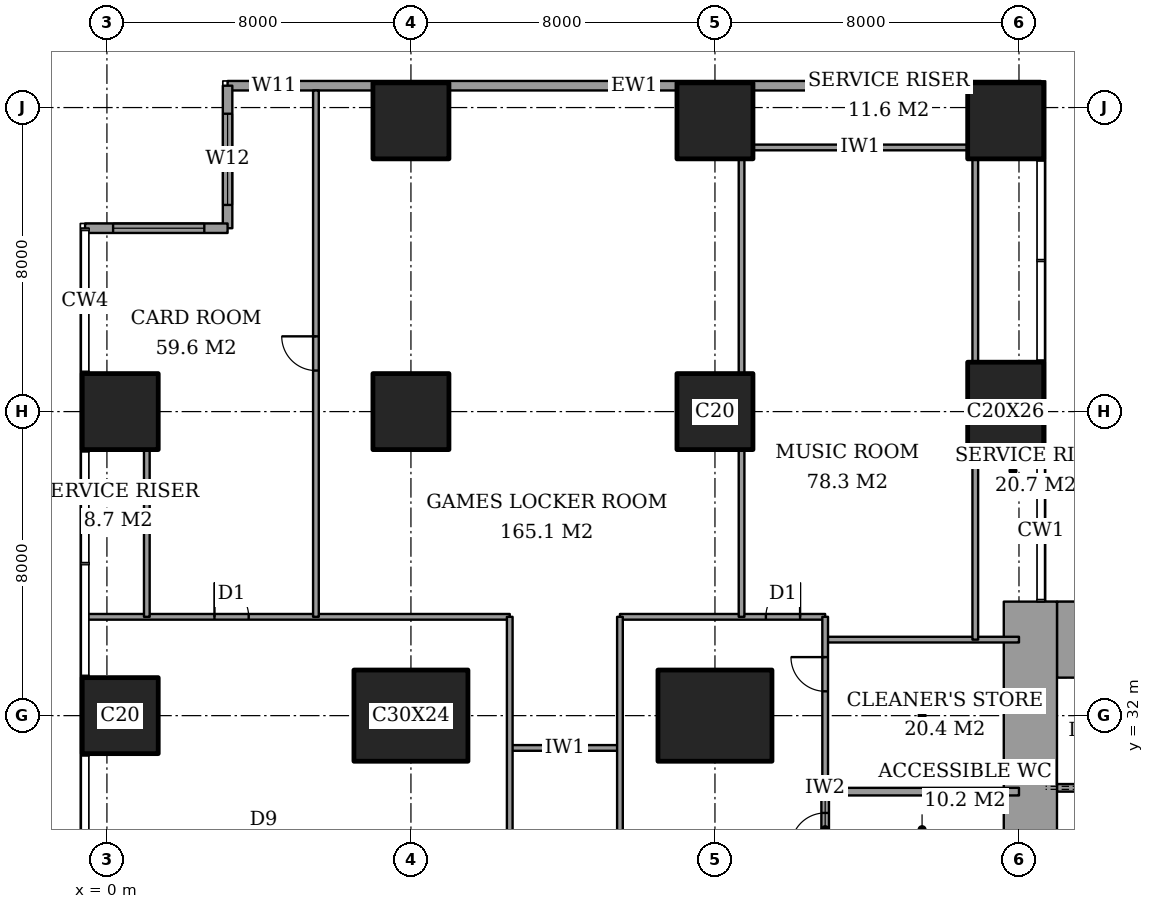
"""IFC4 building model, lengths in metres.
Left out: names, types, materials, properties, quantities, classifications, styles, units other than length and angle.
Written with IfcOpenShell. Run it as: python <this file> out.ifc"""

import sys

from ifc_helpers import new_model, si_unit, direction, frame, frame_2d, origin, origin_2d, place, context, subcontext, project, spatial, rectangle, extrude, element, fill, save


model = new_model("IFC4")
c1 = context("Model", 3, precision=1e-05, world=origin(), true_north=direction((0.0, 1.0)))
c2 = subcontext(c1, "Body", "Model", "MODEL_VIEW")
j1 = project(units=[si_unit("LENGTHUNIT", "METRE"), si_unit("PLANEANGLEUNIT", "RADIAN")], contexts=[c1])
p1 = place(None, origin())
s1 = spatial("IfcSite", under=j1, at=p1, CompositionType="ELEMENT")
p2 = place(p1, origin())
s2 = spatial("IfcBuilding", under=s1, at=p2, CompositionType="ELEMENT")
p3 = place(p2, frame((0.0, 0.0, 132.2)))
s3 = spatial("IfcBuildingStorey", under=s2, at=p3, CompositionType="ELEMENT", Elevation=132.2)
for number, where, z_axis, x_axis in (
    (1, (0.35, 32.0, 0.0), (0.0, 0.0, 1.0), (1.0, 0.0, 0.0)),
    (2, (0.35, 40.0, 0.0), (0.0, 0.0, 1.0), (1.0, 0.0, 0.0)),
):
    element("IfcColumn", number, at=place(p3, frame(where, z_axis=z_axis, x_axis=x_axis)), inside=s3, PredefinedType="COLUMN", context=c2, shape_type="SweptSolid", body=[
        extrude(rectangle(XDim=2.0, YDim=2.0, at=origin_2d()), origin(), (0.0, 0.0, 1.0), 3.6),
    ])
p4 = place(p3, frame((8.0, 32.0, 0.0), z_axis=(0.0, 0.0, 1.0), x_axis=(1.0, 0.0, 0.0)))
e3 = element("IfcColumn", 3, at=p4, inside=s3, PredefinedType="COLUMN", context=c2, shape_type="SweptSolid", body=[
    extrude(rectangle(XDim=3.0, YDim=2.4, at=origin_2d()), origin(), (0.0, 0.0, 1.0), 3.6),
])
for number, where, z_axis, x_axis in (
    (4, (8.0, 40.0, 0.0), (0.0, 0.0, 1.0), (1.0, 0.0, 0.0)),
    (5, (8.0, 47.65, 0.0), (0.0, 0.0, 1.0), (1.0, 0.0, 0.0)),
):
    element("IfcColumn", number, at=place(p3, frame(where, z_axis=z_axis, x_axis=x_axis)), inside=s3, PredefinedType="COLUMN", context=c2, shape_type="SweptSolid", body=[
        extrude(rectangle(XDim=2.0, YDim=2.0, at=origin_2d()), origin(), (0.0, 0.0, 1.0), 3.6),
    ])
p5 = place(p3, frame((16.0, 32.0, 0.0), z_axis=(0.0, 0.0, 1.0), x_axis=(1.0, 0.0, 0.0)))
e6 = element("IfcColumn", 6, at=p5, inside=s3, PredefinedType="COLUMN", context=c2, shape_type="SweptSolid", body=[
    extrude(rectangle(XDim=3.0, YDim=2.4, at=origin_2d()), origin(), (0.0, 0.0, 1.0), 3.6),
])
for number, where, z_axis, x_axis in (
    (7, (16.0, 40.0, 0.0), (0.0, 0.0, 1.0), (1.0, 0.0, 0.0)),
    (8, (16.0, 47.65, 0.0), (0.0, 0.0, 1.0), (1.0, 0.0, 0.0)),
):
    element("IfcColumn", number, at=place(p3, frame(where, z_axis=z_axis, x_axis=x_axis)), inside=s3, PredefinedType="COLUMN", context=c2, shape_type="SweptSolid", body=[
        extrude(rectangle(XDim=2.0, YDim=2.0, at=origin_2d()), origin(), (0.0, 0.0, 1.0), 3.6),
    ])
p6 = place(p3, frame((23.65, 40.0, 0.0), z_axis=(0.0, 0.0, 1.0), x_axis=(1.0, 0.0, 0.0)))
e9 = element("IfcColumn", 9, at=p6, inside=s3, PredefinedType="COLUMN", context=c2, shape_type="SweptSolid", body=[
    extrude(rectangle(XDim=2.0, YDim=2.6, at=origin_2d()), origin(), (0.0, 0.0, 1.0), 3.6),
])
p7 = place(p3, frame((23.65, 47.65, 0.0), z_axis=(0.0, 0.0, 1.0), x_axis=(1.0, 0.0, 0.0)))
e10 = element("IfcColumn", 10, at=p7, inside=s3, PredefinedType="COLUMN", context=c2, shape_type="SweptSolid", body=[
    extrude(rectangle(XDim=2.0, YDim=2.0, at=origin_2d()), origin(), (0.0, 0.0, 1.0), 3.6),
])
p8 = place(p3, frame((25.0, 34.0, 0.0), z_axis=(0.0, 0.0, 1.0), x_axis=(1.0, 0.0, 0.0)))
e11 = element("IfcWall", 11, at=p8, inside=s3, PredefinedType="SHEAR", context=c2, shape_type="SweptSolid", body=[
    extrude(rectangle(XDim=3.15, YDim=2.0, at=frame_2d((1.575, 0.0))), origin(), (0.0, 0.0, 1.0), 3.6),
])
p9 = place(p3, frame((24.3, 23.15, 0.0), z_axis=(0.0, 0.0, 1.0), x_axis=(0.0, 1.0, 0.0)))
e12 = element("IfcWall", 12, at=p9, inside=s3, PredefinedType="SHEAR", context=c2, shape_type="SweptSolid", body=[
    extrude(rectangle(XDim=11.85, YDim=1.4, at=frame_2d((5.925, 0.0))), origin(), (0.0, 0.0, 1.0), 3.6),
])
p10 = place(p9, frame((0.75, 0.0, 0.0)))
e13 = element("IfcOpeningElement", 13, at=p10, cuts=e12, PredefinedType="OPENING", context=c2, shape_type="SweptSolid", body=[
    extrude(rectangle(XDim=1.8, YDim=2.4, at=frame_2d((0.9, 1.2))), frame((0.0, 0.71, 0.0), z_axis=(0.0, -1.0, 0.0), x_axis=(1.0, 0.0, 0.0)), (0.0, 0.0, 1.0), 1.42),
])
p11 = place(p3, frame((24.575, 48.575, 0.0), z_axis=(0.0, 0.0, 1.0), x_axis=(-1.0, 0.0, 0.0)))
e14 = element("IfcWall", 14, at=p11, inside=s3, PredefinedType="SOLIDWALL", context=c2, shape_type="SweptSolid", body=[
    extrude(rectangle(XDim=21.4, YDim=0.25, at=frame_2d((10.7, 0.0))), origin(), (0.0, 0.0, 1.0), 3.6),
])
p12 = place(p11, frame((19.575, 0.0, 0.4)))
e15 = element("IfcOpeningElement", 15, at=p12, cuts=e14, PredefinedType="OPENING", context=c2, shape_type="SweptSolid", body=[
    extrude(rectangle(XDim=1.2, YDim=2.2, at=frame_2d((0.6, 1.1))), frame((0.0, 0.135, 0.0), z_axis=(0.0, -1.0, 0.0), x_axis=(1.0, 0.0, 0.0)), (0.0, 0.0, 1.0), 0.27),
])
p13 = place(p3, frame((3.175, 48.575, 0.0), z_axis=(0.0, 0.0, 1.0), x_axis=(0.0, -1.0, 0.0)))
e16 = element("IfcWall", 16, at=p13, inside=s3, PredefinedType="SOLIDWALL", context=c2, shape_type="SweptSolid", body=[
    extrude(rectangle(XDim=3.75, YDim=0.25, at=frame_2d((1.875, 0.0))), origin(), (0.0, 0.0, 1.0), 3.6),
])
p14 = place(p13, frame((0.738, 0.0, 0.4)))
e17 = element("IfcOpeningElement", 17, at=p14, cuts=e16, PredefinedType="OPENING", context=c2, shape_type="SweptSolid", body=[
    extrude(rectangle(XDim=2.4, YDim=2.2, at=frame_2d((1.2, 1.1))), frame((0.0, 0.135, 0.0), z_axis=(0.0, -1.0, 0.0), x_axis=(1.0, 0.0, 0.0)), (0.0, 0.0, 1.0), 0.27),
])
p15 = place(p3, frame((3.175, 44.825, 0.0), z_axis=(0.0, 0.0, 1.0), x_axis=(-1.0, 0.0, 0.0)))
e18 = element("IfcWall", 18, at=p15, inside=s3, PredefinedType="SOLIDWALL", context=c2, shape_type="SweptSolid", body=[
    extrude(rectangle(XDim=3.75, YDim=0.25, at=frame_2d((1.875, 0.0))), origin(), (0.0, 0.0, 1.0), 3.6),
])
p16 = place(p15, frame((0.613, 0.0, 0.4)))
e19 = element("IfcOpeningElement", 19, at=p16, cuts=e18, PredefinedType="OPENING", context=c2, shape_type="SweptSolid", body=[
    extrude(rectangle(XDim=2.4, YDim=2.2, at=frame_2d((1.2, 1.1))), frame((0.0, 0.135, 0.0), z_axis=(0.0, -1.0, 0.0), x_axis=(1.0, 0.0, 0.0)), (0.0, 0.0, 1.0), 0.27),
])
p17 = place(p3, frame((18.9, 30.0, 0.0), z_axis=(0.0, 0.0, 1.0), x_axis=(1.0, 0.0, 0.0)))
e20 = element("IfcWall", 20, at=p17, inside=s3, PredefinedType="PARTITIONING", context=c2, shape_type="SweptSolid", body=[
    extrude(rectangle(XDim=5.1, YDim=0.2, at=frame_2d((2.55, 0.0))), origin(), (0.0, 0.0, 1.0), 3.35),
])
p18 = place(p3, frame((10.6, 31.15, 0.0), z_axis=(0.0, 0.0, 1.0), x_axis=(1.0, 0.0, 0.0)))
e21 = element("IfcWall", 21, at=p18, inside=s3, PredefinedType="PARTITIONING", context=c2, shape_type="SweptSolid", body=[
    extrude(rectangle(XDim=2.9, YDim=0.15, at=frame_2d((1.45, 0.0))), origin(), (0.0, 0.0, 1.0), 3.35),
])
p19 = place(p3, frame((18.9, 34.0, 0.0), z_axis=(0.0, 0.0, 1.0), x_axis=(1.0, 0.0, 0.0)))
e22 = element("IfcWall", 22, at=p19, inside=s3, PredefinedType="PARTITIONING", context=c2, shape_type="SweptSolid", body=[
    extrude(rectangle(XDim=5.1, YDim=0.15, at=frame_2d((2.55, 0.0))), origin(), (0.0, 0.0, 1.0), 3.35),
])
p20 = place(p3, frame((-0.561, 34.6, 0.0), z_axis=(0.0, 0.0, 1.0), x_axis=(1.0, 0.0, 0.0)))
e23 = element("IfcWall", 23, at=p20, inside=s3, PredefinedType="PARTITIONING", context=c2, shape_type="SweptSolid", body=[
    extrude(rectangle(XDim=11.161, YDim=0.15, at=frame_2d((5.581, 0.0))), origin(), (0.0, 0.0, 1.0), 3.35),
])
p21 = place(p20, frame((3.391, 0.0, 0.0)))
e24 = element("IfcOpeningElement", 24, at=p21, cuts=e23, PredefinedType="OPENING", context=c2, shape_type="SweptSolid", body=[
    extrude(rectangle(XDim=0.9, YDim=2.1, at=frame_2d((0.45, 1.05))), frame((0.0, 0.085, 0.0), z_axis=(0.0, -1.0, 0.0), x_axis=(1.0, 0.0, 0.0)), (0.0, 0.0, 1.0), 0.17),
])
p22 = place(p3, frame((13.5, 34.6, 0.0), z_axis=(0.0, 0.0, 1.0), x_axis=(1.0, 0.0, 0.0)))
e25 = element("IfcWall", 25, at=p22, inside=s3, PredefinedType="PARTITIONING", context=c2, shape_type="SweptSolid", body=[
    extrude(rectangle(XDim=5.4, YDim=0.15, at=frame_2d((2.7, 0.0))), origin(), (0.0, 0.0, 1.0), 3.35),
])
p23 = place(p22, frame((3.84, 0.0, 0.0)))
e26 = element("IfcOpeningElement", 26, at=p23, cuts=e25, PredefinedType="OPENING", context=c2, shape_type="SweptSolid", body=[
    extrude(rectangle(XDim=0.9, YDim=2.1, at=frame_2d((0.45, 1.05))), frame((0.0, 0.085, 0.0), z_axis=(0.0, -1.0, 0.0), x_axis=(1.0, 0.0, 0.0)), (0.0, 0.0, 1.0), 0.17),
])
p24 = place(p3, frame((17.0, 46.95, 0.0), z_axis=(0.0, 0.0, 1.0), x_axis=(1.0, 0.0, 0.0)))
e27 = element("IfcWall", 27, at=p24, inside=s3, PredefinedType="PARTITIONING", context=c2, shape_type="SweptSolid", body=[
    extrude(rectangle(XDim=5.65, YDim=0.15, at=frame_2d((2.825, 0.0))), origin(), (0.0, 0.0, 1.0), 3.35),
])
p25 = place(p3, frame((1.05, 34.6, 0.0), z_axis=(0.0, 0.0, 1.0), x_axis=(0.0, 1.0, 0.0)))
e28 = element("IfcWall", 28, at=p25, inside=s3, PredefinedType="PARTITIONING", context=c2, shape_type="SweptSolid", body=[
    extrude(rectangle(XDim=4.4, YDim=0.15, at=frame_2d((2.2, 0.0))), origin(), (0.0, 0.0, 1.0), 3.35),
])
p26 = place(p3, frame((5.5, 34.6, 0.0), z_axis=(0.0, 0.0, 1.0), x_axis=(0.0, 1.0, 0.0)))
e29 = element("IfcWall", 29, at=p26, inside=s3, PredefinedType="PARTITIONING", context=c2, shape_type="SweptSolid", body=[
    extrude(rectangle(XDim=13.85, YDim=0.15, at=frame_2d((6.925, 0.0))), origin(), (0.0, 0.0, 1.0), 3.35),
])
p27 = place(p26, frame((6.48, 0.0, 0.0)))
e30 = element("IfcOpeningElement", 30, at=p27, cuts=e29, PredefinedType="OPENING", context=c2, shape_type="SweptSolid", body=[
    extrude(rectangle(XDim=0.9, YDim=2.1, at=frame_2d((0.45, 1.05))), frame((0.0, 0.085, 0.0), z_axis=(0.0, -1.0, 0.0), x_axis=(1.0, 0.0, 0.0)), (0.0, 0.0, 1.0), 0.17),
])
p28 = place(p3, frame((10.6, 13.4, 0.0), z_axis=(0.0, 0.0, 1.0), x_axis=(0.0, 1.0, 0.0)))
e31 = element("IfcWall", 31, at=p28, inside=s3, PredefinedType="PARTITIONING", context=c2, shape_type="SweptSolid", body=[
    extrude(rectangle(XDim=21.2, YDim=0.15, at=frame_2d((10.6, 0.0))), origin(), (0.0, 0.0, 1.0), 3.35),
])
p29 = place(p28, frame((10.09, 0.0, 0.0)))
e32 = element("IfcOpeningElement", 32, at=p29, cuts=e31, PredefinedType="OPENING", context=c2, shape_type="SweptSolid", body=[
    extrude(rectangle(XDim=1.0, YDim=2.1, at=frame_2d((0.5, 1.05))), frame((0.0, 0.085, 0.0), z_axis=(0.0, -1.0, 0.0), x_axis=(1.0, 0.0, 0.0)), (0.0, 0.0, 1.0), 0.17),
])
p30 = place(p3, frame((13.5, 13.4, 0.0), z_axis=(0.0, 0.0, 1.0), x_axis=(0.0, 1.0, 0.0)))
e33 = element("IfcWall", 33, at=p30, inside=s3, PredefinedType="PARTITIONING", context=c2, shape_type="SweptSolid", body=[
    extrude(rectangle(XDim=21.2, YDim=0.15, at=frame_2d((10.6, 0.0))), origin(), (0.0, 0.0, 1.0), 3.35),
])
p31 = place(p30, frame((10.15, 0.0, 0.0)))
e34 = element("IfcOpeningElement", 34, at=p31, cuts=e33, PredefinedType="OPENING", context=c2, shape_type="SweptSolid", body=[
    extrude(rectangle(XDim=0.9, YDim=2.1, at=frame_2d((0.45, 1.05))), frame((0.0, 0.085, 0.0), z_axis=(0.0, -1.0, 0.0), x_axis=(1.0, 0.0, 0.0)), (0.0, 0.0, 1.0), 0.17),
])
p32 = place(p3, frame((16.7, 34.6, 0.0), z_axis=(0.0, 0.0, 1.0), x_axis=(0.0, 1.0, 0.0)))
e35 = element("IfcWall", 35, at=p32, inside=s3, PredefinedType="PARTITIONING", context=c2, shape_type="SweptSolid", body=[
    extrude(rectangle(XDim=4.4, YDim=0.15, at=frame_2d((2.2, 0.0))), origin(), (0.0, 0.0, 1.0), 3.35),
])
p33 = place(p3, frame((16.7, 41.0, 0.0), z_axis=(0.0, 0.0, 1.0), x_axis=(0.0, 1.0, 0.0)))
e36 = element("IfcWall", 36, at=p33, inside=s3, PredefinedType="PARTITIONING", context=c2, shape_type="SweptSolid", body=[
    extrude(rectangle(XDim=5.65, YDim=0.15, at=frame_2d((2.825, 0.0))), origin(), (0.0, 0.0, 1.0), 3.35),
])
p34 = place(p3, frame((18.9, 28.0, 0.0), z_axis=(0.0, 0.0, 1.0), x_axis=(0.0, 1.0, 0.0)))
e37 = element("IfcWall", 37, at=p34, inside=s3, PredefinedType="PARTITIONING", context=c2, shape_type="SweptSolid", body=[
    extrude(rectangle(XDim=2.0, YDim=0.2, at=frame_2d((1.0, 0.0))), origin(), (0.0, 0.0, 1.0), 3.35),
])
p35 = place(p34, frame((0.54, 0.0, 0.0)))
e38 = element("IfcOpeningElement", 38, at=p35, cuts=e37, PredefinedType="OPENING", context=c2, shape_type="SweptSolid", body=[
    extrude(rectangle(XDim=0.9, YDim=2.1, at=frame_2d((0.45, 1.05))), frame((0.0, 0.11, 0.0), z_axis=(0.0, -1.0, 0.0), x_axis=(1.0, 0.0, 0.0)), (0.0, 0.0, 1.0), 0.22),
])
p36 = place(p3, frame((18.9, 30.0, 0.0), z_axis=(0.0, 0.0, 1.0), x_axis=(0.0, 1.0, 0.0)))
e39 = element("IfcWall", 39, at=p36, inside=s3, PredefinedType="PARTITIONING", context=c2, shape_type="SweptSolid", body=[
    extrude(rectangle(XDim=4.6, YDim=0.15, at=frame_2d((2.3, 0.0))), origin(), (0.0, 0.0, 1.0), 3.35),
])
p37 = place(p36, frame((2.64, 0.0, 0.0)))
e40 = element("IfcOpeningElement", 40, at=p37, cuts=e39, PredefinedType="OPENING", context=c2, shape_type="SweptSolid", body=[
    extrude(rectangle(XDim=0.9, YDim=2.1, at=frame_2d((0.45, 1.05))), frame((0.0, 0.085, 0.0), z_axis=(0.0, -1.0, 0.0), x_axis=(1.0, 0.0, 0.0)), (0.0, 0.0, 1.0), 0.17),
])
p38 = place(p3, frame((22.85, 34.0, 0.0), z_axis=(0.0, 0.0, 1.0), x_axis=(0.0, 1.0, 0.0)))
e41 = element("IfcWall", 41, at=p38, inside=s3, PredefinedType="PARTITIONING", context=c2, shape_type="SweptSolid", body=[
    extrude(rectangle(XDim=4.7, YDim=0.15, at=frame_2d((2.35, 0.0))), origin(), (0.0, 0.0, 1.0), 3.35),
])
p39 = place(p3, frame((22.85, 41.3, 0.0), z_axis=(0.0, 0.0, 1.0), x_axis=(0.0, 1.0, 0.0)))
e42 = element("IfcWall", 42, at=p39, inside=s3, PredefinedType="PARTITIONING", context=c2, shape_type="SweptSolid", body=[
    extrude(rectangle(XDim=5.35, YDim=0.15, at=frame_2d((2.675, 0.0))), origin(), (0.0, 0.0, 1.0), 3.35),
])
p40 = place(p3, frame((25.0, 30.1, 0.0), z_axis=(0.0, 0.0, 1.0), x_axis=(1.0, 0.0, 0.0)))
e43 = element("IfcWall", 43, at=p40, inside=s3, PredefinedType="PARTITIONING", context=c2, shape_type="SweptSolid", body=[
    extrude(rectangle(XDim=12.7, YDim=0.2, at=frame_2d((6.35, 0.0))), origin(), (0.0, 0.0, 1.0), 3.6),
])
p41 = place(p40, frame((0.9, 0.0, 0.0)))
e44 = element("IfcOpeningElement", 44, at=p41, cuts=e43, PredefinedType="OPENING", context=c2, shape_type="SweptSolid", body=[
    extrude(rectangle(XDim=1.2, YDim=2.1, at=frame_2d((0.6, 1.05))), frame((0.0, 0.11, 0.0), z_axis=(0.0, -1.0, 0.0), x_axis=(1.0, 0.0, 0.0)), (0.0, 0.0, 1.0), 0.22),
])
p42 = place(p12, origin())
e45 = element("IfcWindow", 45, at=p42, inside=s3, PartitioningType="SINGLE_PANEL", PredefinedType="WINDOW", context=c2, shape_type="SweptSolid", body=[
    extrude(rectangle(XDim=1.2, YDim=2.2, at=frame_2d((0.6, 1.1))), frame((0.0, 0.03, 0.0), z_axis=(0.0, -1.0, 0.0), x_axis=(1.0, 0.0, 0.0)), (0.0, 0.0, 1.0), 0.06),
])
fill(e15, e45)
p43 = place(p14, origin())
e46 = element("IfcWindow", 46, at=p43, inside=s3, PartitioningType="SINGLE_PANEL", PredefinedType="WINDOW", context=c2, shape_type="SweptSolid", body=[
    extrude(rectangle(XDim=2.4, YDim=2.2, at=frame_2d((1.2, 1.1))), frame((0.0, 0.03, 0.0), z_axis=(0.0, -1.0, 0.0), x_axis=(1.0, 0.0, 0.0)), (0.0, 0.0, 1.0), 0.06),
])
fill(e17, e46)
p44 = place(p16, origin())
e47 = element("IfcWindow", 47, at=p44, inside=s3, PartitioningType="SINGLE_PANEL", PredefinedType="WINDOW", context=c2, shape_type="SweptSolid", body=[
    extrude(rectangle(XDim=2.4, YDim=2.2, at=frame_2d((1.2, 1.1))), frame((0.0, 0.03, 0.0), z_axis=(0.0, -1.0, 0.0), x_axis=(1.0, 0.0, 0.0)), (0.0, 0.0, 1.0), 0.06),
])
fill(e19, e47)
p45 = place(p35, origin())
e48 = element("IfcDoor", 48, at=p45, inside=s3, OperationType="SINGLE_SWING_RIGHT", PredefinedType="DOOR", context=c2, shape_type="SweptSolid", body=[
    extrude(rectangle(XDim=0.9, YDim=2.1, at=frame_2d((0.45, 1.05))), frame((0.0, 0.025, 0.0), z_axis=(0.0, -1.0, 0.0), x_axis=(1.0, 0.0, 0.0)), (0.0, 0.0, 1.0), 0.05),
])
fill(e38, e48)
p46 = place(p37, origin())
e49 = element("IfcDoor", 49, at=p46, inside=s3, OperationType="SINGLE_SWING_LEFT", PredefinedType="DOOR", context=c2, shape_type="SweptSolid", body=[
    extrude(rectangle(XDim=0.9, YDim=2.1, at=frame_2d((0.45, 1.05))), frame((0.0, 0.025, 0.0), z_axis=(0.0, -1.0, 0.0), x_axis=(1.0, 0.0, 0.0)), (0.0, 0.0, 1.0), 0.05),
])
fill(e40, e49)
p47 = place(p21, origin())
e50 = element("IfcDoor", 50, at=p47, inside=s3, OperationType="SINGLE_SWING_RIGHT", PredefinedType="DOOR", context=c2, shape_type="SweptSolid", body=[
    extrude(rectangle(XDim=0.9, YDim=2.1, at=frame_2d((0.45, 1.05))), frame((0.0, 0.025, 0.0), z_axis=(0.0, -1.0, 0.0), x_axis=(1.0, 0.0, 0.0)), (0.0, 0.0, 1.0), 0.05),
])
fill(e24, e50)
p48 = place(p27, origin())
e51 = element("IfcDoor", 51, at=p48, inside=s3, OperationType="SINGLE_SWING_LEFT", PredefinedType="DOOR", context=c2, shape_type="SweptSolid", body=[
    extrude(rectangle(XDim=0.9, YDim=2.1, at=frame_2d((0.45, 1.05))), frame((0.0, 0.025, 0.0), z_axis=(0.0, -1.0, 0.0), x_axis=(1.0, 0.0, 0.0)), (0.0, 0.0, 1.0), 0.05),
])
fill(e30, e51)
p49 = place(p23, origin())
e52 = element("IfcDoor", 52, at=p49, inside=s3, OperationType="SINGLE_SWING_LEFT", PredefinedType="DOOR", context=c2, shape_type="SweptSolid", body=[
    extrude(rectangle(XDim=0.9, YDim=2.1, at=frame_2d((0.45, 1.05))), frame((0.0, 0.025, 0.0), z_axis=(0.0, -1.0, 0.0), x_axis=(1.0, 0.0, 0.0)), (0.0, 0.0, 1.0), 0.05),
])
fill(e26, e52)
save(model, sys.argv[1])
